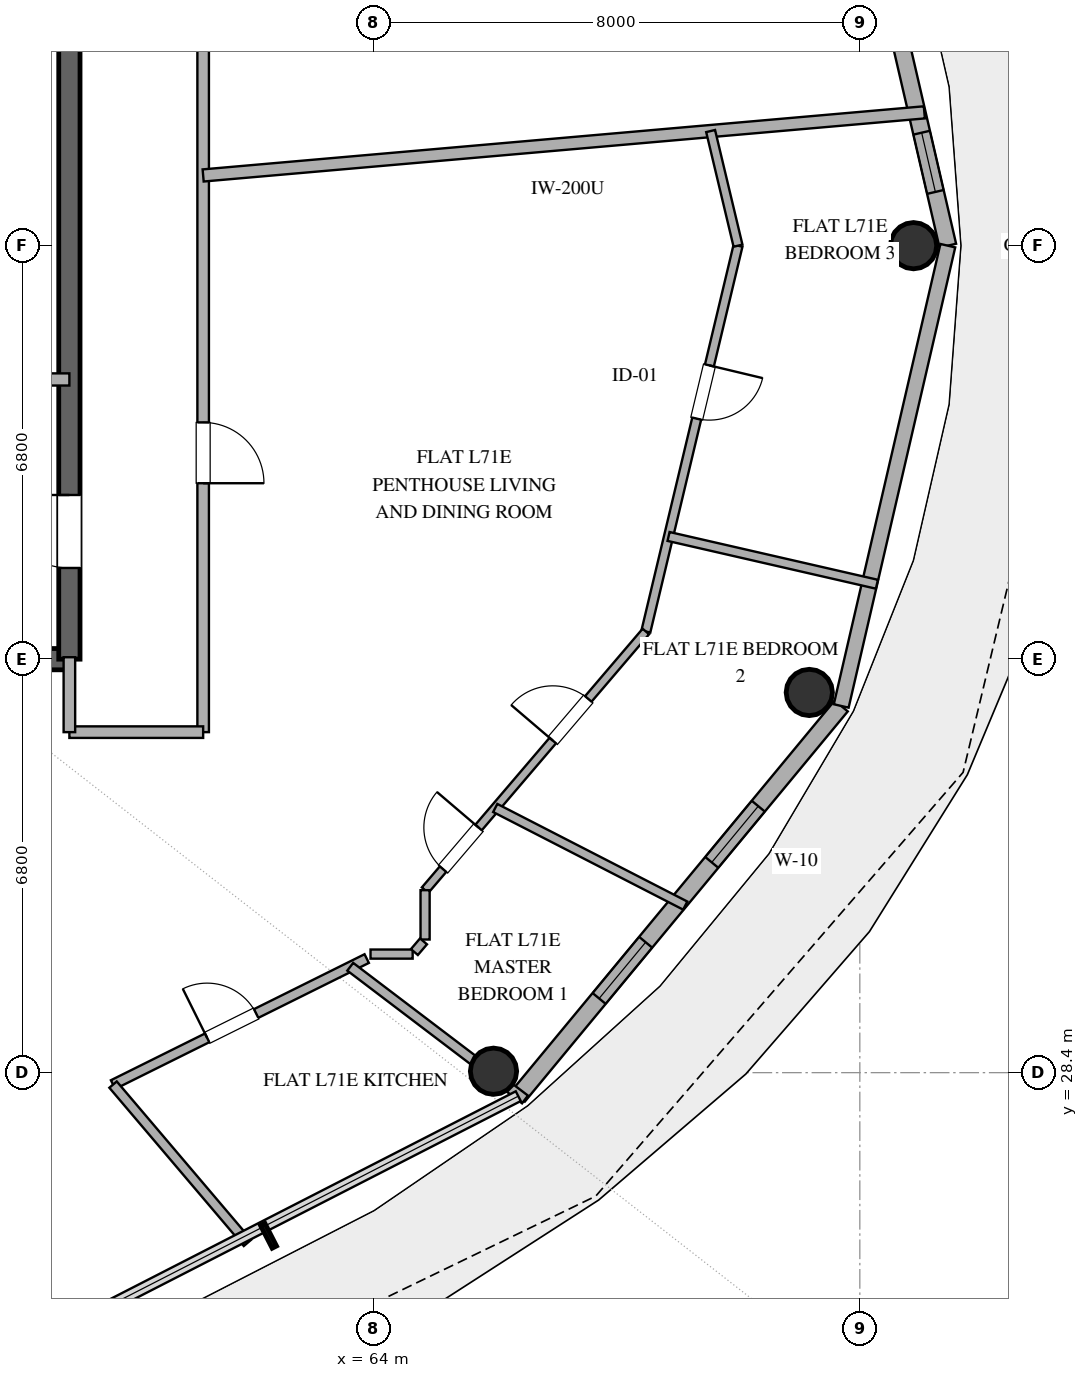
"""IFC4 building model, lengths in metres.
Left out: names, types, materials, properties, quantities, classifications, styles, units other than length and angle.
Written with IfcOpenShell. Run it as: python <this file> out.ifc"""

import sys

from ifc_helpers import new_model, si_unit, direction, frame, frame_2d, origin, origin_2d, place, context, subcontext, project, spatial, rectangle, hollow_circle, extrude, element, fill, save


model = new_model("IFC4")
c1 = context("Model", 3, precision=1e-05, world=origin(), true_north=direction((0.0, 1.0)))
c2 = subcontext(c1, "Body", "Model", "MODEL_VIEW")
j1 = project(units=[si_unit("LENGTHUNIT", "METRE"), si_unit("PLANEANGLEUNIT", "RADIAN")], contexts=[c1])
p1 = place(None, origin())
s1 = spatial("IfcSite", under=j1, at=p1, CompositionType="ELEMENT")
p2 = place(p1, origin())
s2 = spatial("IfcBuilding", under=s1, at=p2, CompositionType="ELEMENT")
p3 = place(p2, frame((0.0, 0.0, 276.6)))
s3 = spatial("IfcBuildingStorey", under=s2, at=p3, CompositionType="ELEMENT", Elevation=276.6)
p4 = place(p3, frame((55.0, 35.2, 0.0), z_axis=(0.0, 0.0, 1.0), x_axis=(1.0, 0.0, 0.0)))
e1 = element("IfcWall", 1, at=p4, inside=s3, PredefinedType="SHEAR", context=c2, shape_type="SweptSolid", body=[
    extrude(rectangle(XDim=4.0, YDim=0.35, at=frame_2d((2.0, 0.0))), origin(), (0.0, 0.0, 1.0), 3.37),
])
p5 = place(p3, frame((59.0, 35.2, 0.0), z_axis=(0.0, 0.0, 1.0), x_axis=(0.0, 1.0, 0.0)))
e2 = element("IfcWall", 2, at=p5, inside=s3, PredefinedType="SHEAR", context=c2, shape_type="SweptSolid", body=[
    extrude(rectangle(XDim=13.6, YDim=0.35, at=frame_2d((6.8, 0.0))), origin(), (0.0, 0.0, 1.0), 3.37),
])
p6 = place(p5, frame((1.5, 0.0, 0.0)))
e3 = element("IfcOpeningElement", 3, at=p6, cuts=e2, PredefinedType="OPENING", context=c2, shape_type="SweptSolid", body=[
    extrude(rectangle(XDim=1.2, YDim=2.15, at=frame_2d((0.6, 1.075))), frame((0.0, 0.185, 0.0), z_axis=(0.0, -1.0, 0.0), x_axis=(1.0, 0.0, 0.0)), (0.0, 0.0, 1.0), 0.37),
])
for number, where, z_axis, x_axis in (
    (4, (72.883, 42.0, 0.0), (0.0, 0.0, 1.0), (1.0, 0.0, 0.0)),
    (5, (65.975, 28.424, 0.0), (0.0, 0.0, 1.0), (1.0, 0.0, 0.0)),
    (6, (71.169, 34.653, 0.0), (0.0, 0.0, 1.0), (1.0, 0.0, 0.0)),
):
    element("IfcColumn", number, at=place(p3, frame(where, z_axis=z_axis, x_axis=x_axis)), inside=s3, PredefinedType="COLUMN", context=c2, shape_type="SweptSolid", body=[
        extrude(hollow_circle(Radius=0.381, WallThickness=0.025, at=origin_2d()), origin(), (0.0, 0.0, 1.0), 3.37),
    ])
p7 = place(p3, frame((73.447, 42.0, 0.0), z_axis=(0.0, 0.0, 1.0), x_axis=(-0.225635078214, 0.974211892495, 0.0)))
e7 = element("IfcWall", 7, at=p7, inside=s3, PredefinedType="SOLIDWALL", context=c2, shape_type="SweptSolid", body=[
    extrude(rectangle(XDim=7.77, YDim=0.28, at=frame_2d((3.885, 0.0))), origin(), (0.0, 0.0, 1.0), 3.37),
])
p8 = place(p7, frame((5.192, 0.0, 0.0)))
e8 = element("IfcOpeningElement", 8, at=p8, cuts=e7, PredefinedType="OPENING", context=c2, shape_type="SweptSolid", body=[
    extrude(rectangle(XDim=1.05, YDim=2.2, at=frame_2d((0.525, 1.1))), frame((0.0, 0.15, 0.0), z_axis=(0.0, -1.0, 0.0), x_axis=(1.0, 0.0, 0.0)), (0.0, 0.0, 1.0), 0.3),
])
p9 = place(p7, frame((0.907, 0.0, 0.85)))
e9 = element("IfcOpeningElement", 9, at=p9, cuts=e7, PredefinedType="OPENING", context=c2, shape_type="SweptSolid", body=[
    extrude(rectangle(XDim=1.0, YDim=1.8, at=frame_2d((0.5, 0.9))), frame((0.0, 0.15, 0.0), z_axis=(0.0, -1.0, 0.0), x_axis=(1.0, 0.0, 0.0)), (0.0, 0.0, 1.0), 0.3),
])
p10 = place(p3, frame((66.383, 28.013, 0.0), z_axis=(0.0, 0.0, 1.0), x_axis=(0.63761509934, 0.770355103243, 0.0)))
e10 = element("IfcWall", 10, at=p10, inside=s3, PredefinedType="SOLIDWALL", context=c2, shape_type="SweptSolid", body=[
    extrude(rectangle(XDim=8.33, YDim=0.28, at=frame_2d((4.165, 0.0))), origin(), (0.0, 0.0, 1.0), 3.37),
])
p11 = place(p10, frame((2.086, 0.0, 0.85)))
e11 = element("IfcOpeningElement", 11, at=p11, cuts=e10, PredefinedType="OPENING", context=c2, shape_type="SweptSolid", body=[
    extrude(rectangle(XDim=1.2, YDim=1.8, at=frame_2d((0.6, 0.9))), frame((0.0, 0.15, 0.0), z_axis=(0.0, -1.0, 0.0), x_axis=(1.0, 0.0, 0.0)), (0.0, 0.0, 1.0), 0.3),
])
p12 = place(p10, frame((4.991, 0.0, 0.85)))
e12 = element("IfcOpeningElement", 12, at=p12, cuts=e10, PredefinedType="OPENING", context=c2, shape_type="SweptSolid", body=[
    extrude(rectangle(XDim=1.2, YDim=1.6, at=frame_2d((0.6, 0.8))), frame((0.0, 0.15, 0.0), z_axis=(0.0, -1.0, 0.0), x_axis=(1.0, 0.0, 0.0)), (0.0, 0.0, 1.0), 0.3),
])
p13 = place(p3, frame((71.694, 34.43, 0.0), z_axis=(0.0, 0.0, 1.0), x_axis=(0.225635078214, 0.974211892495, 0.0)))
e13 = element("IfcWall", 13, at=p13, inside=s3, PredefinedType="SOLIDWALL", context=c2, shape_type="SweptSolid", body=[
    extrude(rectangle(XDim=7.77, YDim=0.25, at=frame_2d((3.885, 0.0))), origin(), (0.0, 0.0, 1.0), 3.37),
])
p14 = place(p3, frame((55.0, 39.8, 0.0), z_axis=(0.0, 0.0, 1.0), x_axis=(1.0, 0.0, 0.0)))
e14 = element("IfcWall", 14, at=p14, inside=s3, PredefinedType="SOLIDWALL", context=c2, shape_type="SweptSolid", body=[
    extrude(rectangle(XDim=4.0, YDim=0.2, at=frame_2d((2.0, 0.0))), origin(), (0.0, 0.0, 1.0), 2.73),
])
p15 = place(p14, frame((1.45, 0.0, 0.0)))
e15 = element("IfcOpeningElement", 15, at=p15, cuts=e14, PredefinedType="OPENING", context=c2, shape_type="SweptSolid", body=[
    extrude(rectangle(XDim=1.1, YDim=2.15, at=frame_2d((0.55, 1.075))), frame((0.0, 0.11, 0.0), z_axis=(0.0, -1.0, 0.0), x_axis=(1.0, 0.0, 0.0)), (0.0, 0.0, 1.0), 0.22),
])
p16 = place(p3, frame((61.2, 50.9, 0.0), z_axis=(0.0, 0.0, 1.0), x_axis=(0.0, -1.0, 0.0)))
e16 = element("IfcWall", 16, at=p16, inside=s3, PredefinedType="PARTITIONING", context=c2, shape_type="SweptSolid", body=[
    extrude(rectangle(XDim=16.9, YDim=0.19, at=frame_2d((8.45, 0.0))), origin(), (0.0, 0.0, 1.0), 2.73),
])
p17 = place(p16, frame((11.807, 0.0, 0.0)))
e17 = element("IfcOpeningElement", 17, at=p17, cuts=e16, PredefinedType="OPENING", context=c2, shape_type="SweptSolid", body=[
    extrude(rectangle(XDim=1.0, YDim=2.2, at=frame_2d((0.5, 1.1))), frame((0.0, 0.105, 0.0), z_axis=(0.0, -1.0, 0.0), x_axis=(1.0, 0.0, 0.0)), (0.0, 0.0, 1.0), 0.21),
])
p18 = place(p16, frame((3.389, 0.0, 0.0)))
e18 = element("IfcOpeningElement", 18, at=p18, cuts=e16, PredefinedType="OPENING", context=c2, shape_type="SweptSolid", body=[
    extrude(rectangle(XDim=1.0, YDim=2.2, at=frame_2d((0.5, 1.1))), frame((0.0, 0.105, 0.0), z_axis=(0.0, -1.0, 0.0), x_axis=(1.0, 0.0, 0.0)), (0.0, 0.0, 1.0), 0.21),
])
p19 = place(p3, frame((73.061, 44.192, 0.0), z_axis=(0.0, 0.0, 1.0), x_axis=(-0.996195520097, -0.087146346673, 0.0)))
e19 = element("IfcWall", 19, at=p19, inside=s3, PredefinedType="PARTITIONING", context=c2, shape_type="SweptSolid", body=[
    extrude(rectangle(XDim=11.906, YDim=0.2, at=frame_2d((5.953, 0.0))), origin(), (0.0, 0.0, 1.0), 2.73),
])
p20 = place(p3, frame((69.996, 42.0, 0.0), z_axis=(0.0, 0.0, 1.0), x_axis=(-0.232298462197, -0.972644551962, 0.0)))
e20 = element("IfcWall", 20, at=p20, inside=s3, PredefinedType="PARTITIONING", context=c2, shape_type="SweptSolid", body=[
    extrude(rectangle(XDim=6.523, YDim=0.15, at=frame_2d((3.262, 0.0))), origin(), (0.0, 0.0, 1.0), 2.73),
])
p21 = place(p20, frame((2.024, 0.0, 0.0)))
e21 = element("IfcOpeningElement", 21, at=p21, cuts=e20, PredefinedType="OPENING", context=c2, shape_type="SweptSolid", body=[
    extrude(rectangle(XDim=0.9, YDim=2.1, at=frame_2d((0.45, 1.05))), frame((0.0, 0.085, 0.0), z_axis=(0.0, -1.0, 0.0), x_axis=(1.0, 0.0, 0.0)), (0.0, 0.0, 1.0), 0.17),
])
p22 = place(p3, frame((59.718, 28.204, 0.0), z_axis=(0.0, 0.0, 1.0), x_axis=(0.895587741002, 0.444884926882, 0.0)))
e22 = element("IfcWall", 22, at=p22, inside=s3, PredefinedType="PLUMBINGWALL", context=c2, shape_type="SweptSolid", body=[
    extrude(rectangle(XDim=4.658, YDim=0.16, at=frame_2d((2.329, 0.0))), origin(), (0.0, 0.0, 1.0), 2.73),
])
p23 = place(p22, frame((1.728, 0.0, 0.0)))
e23 = element("IfcOpeningElement", 23, at=p23, cuts=e22, PredefinedType="OPENING", context=c2, shape_type="SweptSolid", body=[
    extrude(rectangle(XDim=0.9, YDim=2.1, at=frame_2d((0.45, 1.05))), frame((0.0, 0.09, 0.0), z_axis=(0.0, -1.0, 0.0), x_axis=(1.0, 0.0, 0.0)), (0.0, 0.0, 1.0), 0.18),
])
p24 = place(p3, frame((64.85, 31.401, 0.0), z_axis=(0.0, 0.0, 1.0), x_axis=(0.649208179997, 0.760610767097, 0.0)))
e24 = element("IfcWall", 24, at=p24, inside=s3, PredefinedType="PARTITIONING", context=c2, shape_type="SweptSolid", body=[
    extrude(rectangle(XDim=5.593, YDim=0.14, at=frame_2d((2.796, 0.0))), origin(), (0.0, 0.0, 1.0), 2.73),
])
p25 = place(p24, frame((3.235, 0.0, 0.0)))
e25 = element("IfcOpeningElement", 25, at=p25, cuts=e24, PredefinedType="OPENING", context=c2, shape_type="SweptSolid", body=[
    extrude(rectangle(XDim=0.9, YDim=2.1, at=frame_2d((0.45, 1.05))), frame((0.0, 0.08, 0.0), z_axis=(0.0, -1.0, 0.0), x_axis=(1.0, 0.0, 0.0)), (0.0, 0.0, 1.0), 0.16),
])
p26 = place(p24, frame((0.455, 0.0, 0.0)))
e26 = element("IfcOpeningElement", 26, at=p26, cuts=e24, PredefinedType="OPENING", context=c2, shape_type="SweptSolid", body=[
    extrude(rectangle(XDim=0.9, YDim=2.1, at=frame_2d((0.45, 1.05))), frame((0.0, 0.08, 0.0), z_axis=(0.0, -1.0, 0.0), x_axis=(1.0, 0.0, 0.0)), (0.0, 0.0, 1.0), 0.16),
])
p27 = place(p3, frame((63.619, 30.142, 0.0), z_axis=(0.0, 0.0, 1.0), x_axis=(0.796471054337, -0.604676657068, 0.0)))
e27 = element("IfcWall", 27, at=p27, inside=s3, PredefinedType="PLUMBINGWALL", context=c2, shape_type="SweptSolid", body=[
    extrude(rectangle(XDim=3.609, YDim=0.16, at=frame_2d((1.804, 0.0))), origin(), (0.0, 0.0, 1.0), 2.73),
])
p28 = place(p3, frame((72.281, 36.432, 0.0), z_axis=(0.0, 0.0, 1.0), x_axis=(-0.974703956651, 0.223499881182, 0.0)))
e28 = element("IfcWall", 28, at=p28, inside=s3, PredefinedType="PARTITIONING", context=c2, shape_type="SweptSolid", body=[
    extrude(rectangle(XDim=3.515, YDim=0.15, at=frame_2d((1.758, 0.0))), origin(), (0.0, 0.0, 1.0), 2.73),
])
p29 = place(p3, frame((69.129, 31.148, 0.0), z_axis=(0.0, 0.0, 1.0), x_axis=(-0.889538013169, 0.456861163951, 0.0)))
e29 = element("IfcWall", 29, at=p29, inside=s3, PredefinedType="PARTITIONING", context=c2, shape_type="SweptSolid", body=[
    extrude(rectangle(XDim=3.513, YDim=0.15, at=frame_2d((1.756, 0.0))), origin(), (0.0, 0.0, 1.0), 2.73),
])
p30 = place(p3, frame((61.929, 25.601, 0.0), z_axis=(0.0, 0.0, 1.0), x_axis=(-0.64737032118, 0.762175614446, 0.0)))
e30 = element("IfcWall", 30, at=p30, inside=s3, PredefinedType="PLUMBINGWALL", context=c2, shape_type="SweptSolid", body=[
    extrude(rectangle(XDim=3.415, YDim=0.16, at=frame_2d((1.708, 0.0))), origin(), (0.0, 0.0, 1.0), 2.73),
])
p31 = place(p3, frame((61.2, 34.0, 0.0), z_axis=(0.0, 0.0, 1.0), x_axis=(-1.0, 0.0, 0.0)))
e31 = element("IfcWall", 31, at=p31, inside=s3, PredefinedType="PARTITIONING", context=c2, shape_type="SweptSolid", body=[
    extrude(rectangle(XDim=2.2, YDim=0.19, at=frame_2d((1.1, 0.0))), origin(), (0.0, 0.0, 1.0), 2.73),
])
p32 = place(p3, frame((69.546, 43.885, 0.0), z_axis=(0.0, 0.0, 1.0), x_axis=(0.232296027223, -0.972645133508, 0.0)))
e32 = element("IfcWall", 32, at=p32, inside=s3, PredefinedType="PARTITIONING", context=c2, shape_type="SweptSolid", body=[
    extrude(rectangle(XDim=1.938, YDim=0.15, at=frame_2d((0.969, 0.0))), origin(), (0.0, 0.0, 1.0), 2.73),
])
p33 = place(p3, frame((59.0, 34.0, 0.0), z_axis=(0.0, 0.0, 1.0), x_axis=(0.0, 1.0, 0.0)))
e33 = element("IfcWall", 33, at=p33, inside=s3, PredefinedType="PARTITIONING", context=c2, shape_type="SweptSolid", body=[
    extrude(rectangle(XDim=1.232, YDim=0.19, at=frame_2d((0.616, 0.0))), origin(), (0.0, 0.0, 1.0), 2.73),
])
p34 = place(p3, frame((64.85, 31.401, 0.0), z_axis=(0.0, 0.0, 1.0), x_axis=(0.0, -1.0, 0.0)))
e34 = element("IfcWall", 34, at=p34, inside=s3, PredefinedType="PARTITIONING", context=c2, shape_type="SweptSolid", body=[
    extrude(rectangle(XDim=0.812, YDim=0.15, at=frame_2d((0.406, 0.0))), origin(), (0.0, 0.0, 1.0), 2.73),
])
p35 = place(p3, frame((64.646, 30.35, 0.0), z_axis=(0.0, 0.0, 1.0), x_axis=(-1.0, 0.0, 0.0)))
e35 = element("IfcWall", 35, at=p35, inside=s3, PredefinedType="PARTITIONING", context=c2, shape_type="SweptSolid", body=[
    extrude(rectangle(XDim=0.693, YDim=0.15, at=frame_2d((0.346, 0.0))), origin(), (0.0, 0.0, 1.0), 2.73),
])
p36 = place(p3, frame((64.824, 30.559, 0.0), z_axis=(0.0, 0.0, 1.0), x_axis=(-0.648874632887, -0.760895334981, 0.0)))
e36 = element("IfcWall", 36, at=p36, inside=s3, PredefinedType="PARTITIONING", context=c2, shape_type="SweptSolid", body=[
    extrude(rectangle(XDim=0.231, YDim=0.15, at=frame_2d((0.115, 0.0))), origin(), (0.0, 0.0, 1.0), 2.73),
])
p37 = place(p11, origin())
e37 = element("IfcWindow", 37, at=p37, inside=s3, PartitioningType="SINGLE_PANEL", PredefinedType="WINDOW", context=c2, shape_type="SweptSolid", body=[
    extrude(rectangle(XDim=1.2, YDim=1.8, at=frame_2d((0.6, 0.9))), frame((0.0, 0.03, 0.0), z_axis=(0.0, -1.0, 0.0), x_axis=(1.0, 0.0, 0.0)), (0.0, 0.0, 1.0), 0.06),
])
fill(e11, e37)
p38 = place(p12, origin())
e38 = element("IfcWindow", 38, at=p38, inside=s3, PartitioningType="SINGLE_PANEL", PredefinedType="WINDOW", context=c2, shape_type="SweptSolid", body=[
    extrude(rectangle(XDim=1.2, YDim=1.6, at=frame_2d((0.6, 0.8))), frame((0.0, 0.03, 0.0), z_axis=(0.0, -1.0, 0.0), x_axis=(1.0, 0.0, 0.0)), (0.0, 0.0, 1.0), 0.06),
])
fill(e12, e38)
p39 = place(p9, origin())
e39 = element("IfcWindow", 39, at=p39, inside=s3, PartitioningType="SINGLE_PANEL", PredefinedType="WINDOW", context=c2, shape_type="SweptSolid", body=[
    extrude(rectangle(XDim=1.0, YDim=1.8, at=frame_2d((0.5, 0.9))), frame((0.0, 0.03, 0.0), z_axis=(0.0, -1.0, 0.0), x_axis=(1.0, 0.0, 0.0)), (0.0, 0.0, 1.0), 0.06),
])
fill(e9, e39)
p40 = place(p6, origin())
e40 = element("IfcDoor", 40, at=p40, inside=s3, OperationType="SINGLE_SWING_RIGHT", PredefinedType="DOOR", context=c2, shape_type="SweptSolid", body=[
    extrude(rectangle(XDim=1.2, YDim=2.15, at=frame_2d((0.6, 1.075))), frame((0.0, 0.025, 0.0), z_axis=(0.0, -1.0, 0.0), x_axis=(1.0, 0.0, 0.0)), (0.0, 0.0, 1.0), 0.05),
])
fill(e3, e40)
p41 = place(p17, origin())
e41 = element("IfcDoor", 41, at=p41, inside=s3, OperationType="SINGLE_SWING_RIGHT", PredefinedType="DOOR", context=c2, shape_type="SweptSolid", body=[
    extrude(rectangle(XDim=1.0, YDim=2.2, at=frame_2d((0.5, 1.1))), frame((0.0, 0.025, 0.0), z_axis=(0.0, -1.0, 0.0), x_axis=(1.0, 0.0, 0.0)), (0.0, 0.0, 1.0), 0.05),
])
fill(e17, e41)
p42 = place(p21, origin())
e42 = element("IfcDoor", 42, at=p42, inside=s3, OperationType="SINGLE_SWING_LEFT", PredefinedType="DOOR", context=c2, shape_type="SweptSolid", body=[
    extrude(rectangle(XDim=0.9, YDim=2.1, at=frame_2d((0.45, 1.05))), frame((0.0, 0.025, 0.0), z_axis=(0.0, -1.0, 0.0), x_axis=(1.0, 0.0, 0.0)), (0.0, 0.0, 1.0), 0.05),
])
fill(e21, e42)
p43 = place(p23, origin())
e43 = element("IfcDoor", 43, at=p43, inside=s3, OperationType="SINGLE_SWING_LEFT", PredefinedType="DOOR", context=c2, shape_type="SweptSolid", body=[
    extrude(rectangle(XDim=0.9, YDim=2.1, at=frame_2d((0.45, 1.05))), frame((0.0, 0.025, 0.0), z_axis=(0.0, -1.0, 0.0), x_axis=(1.0, 0.0, 0.0)), (0.0, 0.0, 1.0), 0.05),
])
fill(e23, e43)
p44 = place(p25, origin())
e44 = element("IfcDoor", 44, at=p44, inside=s3, OperationType="SINGLE_SWING_LEFT", PredefinedType="DOOR", context=c2, shape_type="SweptSolid", body=[
    extrude(rectangle(XDim=0.9, YDim=2.1, at=frame_2d((0.45, 1.05))), frame((0.0, 0.025, 0.0), z_axis=(0.0, -1.0, 0.0), x_axis=(1.0, 0.0, 0.0)), (0.0, 0.0, 1.0), 0.05),
])
fill(e25, e44)
p45 = place(p26, origin())
e45 = element("IfcDoor", 45, at=p45, inside=s3, OperationType="SINGLE_SWING_RIGHT", PredefinedType="DOOR", context=c2, shape_type="SweptSolid", body=[
    extrude(rectangle(XDim=0.9, YDim=2.1, at=frame_2d((0.45, 1.05))), frame((0.0, 0.025, 0.0), z_axis=(0.0, -1.0, 0.0), x_axis=(1.0, 0.0, 0.0)), (0.0, 0.0, 1.0), 0.05),
])
fill(e26, e45)
save(model, sys.argv[1])
